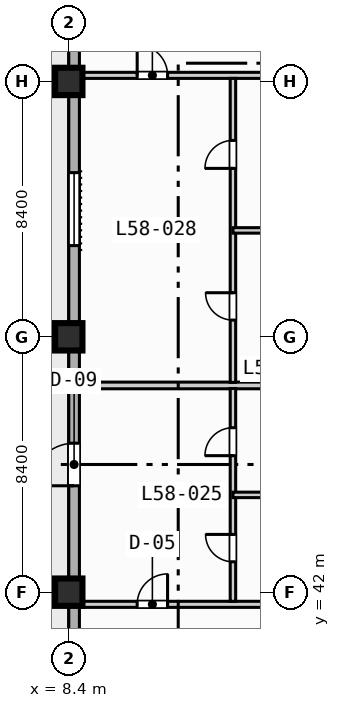
"""IFC4 building model, lengths in metres.
Left out: names, types, materials, properties, quantities, classifications, styles, units other than length and angle.
Written with IfcOpenShell. Run it as: python <this file> out.ifc"""

import sys

from ifc_helpers import new_model, si_unit, direction, frame, frame_2d, origin, origin_2d, place, context, subcontext, project, spatial, rectangle, extrude, element, fill, save


model = new_model("IFC4")
c1 = context("Model", 3, precision=1e-05, world=origin(), true_north=direction((0.0, 1.0)))
c2 = subcontext(c1, "Body", "Model", "MODEL_VIEW")
j1 = project(units=[si_unit("LENGTHUNIT", "METRE"), si_unit("PLANEANGLEUNIT", "RADIAN")], contexts=[c1])
p1 = place(None, origin())
s1 = spatial("IfcSite", under=j1, at=p1, CompositionType="ELEMENT")
p2 = place(p1, origin())
s2 = spatial("IfcBuilding", under=s1, at=p2, CompositionType="ELEMENT")
p3 = place(p2, frame((0.0, 0.0, 237.9)))
s3 = spatial("IfcBuildingStorey", under=s2, at=p3, CompositionType="ELEMENT", Elevation=237.9)
for number, where, z_axis, x_axis in (
    (1, (8.4, 42.0, 0.0), (0.0, 0.0, 1.0), (1.0, 0.0, 0.0)),
    (2, (8.4, 50.4, 0.0), (0.0, 0.0, 1.0), (1.0, 0.0, 0.0)),
    (3, (8.4, 58.8, 0.0), (0.0, 0.0, 1.0), (1.0, 0.0, 0.0)),
):
    element("IfcColumn", number, at=place(p3, frame(where, z_axis=z_axis, x_axis=x_axis)), inside=s3, PredefinedType="COLUMN", context=c2, shape_type="SweptSolid", body=[
        extrude(rectangle(XDim=0.9, YDim=0.9, at=origin_2d()), origin(), (0.0, 0.0, 1.0), 3.7),
    ])
p4 = place(p3, frame((8.575, 11.575, 0.0), z_axis=(0.0, 0.0, 1.0), x_axis=(0.0, 1.0, 0.0)))
e4 = element("IfcWall", 4, at=p4, inside=s3, PredefinedType="STANDARD", context=c2, shape_type="SweptSolid", body=[
    extrude(rectangle(XDim=60.85, YDim=0.35, at=frame_2d((30.425, 0.0))), origin(), (0.0, 0.0, 1.0), 3.47),
])
p5 = place(p4, frame((33.925, 0.0, 0.0)))
e5 = element("IfcOpeningElement", 5, at=p5, cuts=e4, PredefinedType="OPENING", context=c2, shape_type="SweptSolid", body=[
    extrude(rectangle(XDim=1.4, YDim=2.2, at=frame_2d((0.7, 1.1))), frame((0.0, 0.185, 0.0), z_axis=(0.0, -1.0, 0.0), x_axis=(1.0, 0.0, 0.0)), (0.0, 0.0, 1.0), 0.37),
])
p6 = place(p4, frame((25.025, 0.0, 0.85)))
e6 = element("IfcOpeningElement", 6, at=p6, cuts=e4, PredefinedType="OPENING", context=c2, shape_type="SweptSolid", body=[
    extrude(rectangle(XDim=2.4, YDim=1.95, at=frame_2d((1.2, 0.975))), frame((0.0, 0.185, 0.0), z_axis=(0.0, -1.0, 0.0), x_axis=(1.0, 0.0, 0.0)), (0.0, 0.0, 1.0), 0.37),
])
p7 = place(p4, frame((41.825, 0.0, 0.85)))
e7 = element("IfcOpeningElement", 7, at=p7, cuts=e4, PredefinedType="OPENING", context=c2, shape_type="SweptSolid", body=[
    extrude(rectangle(XDim=2.4, YDim=1.95, at=frame_2d((1.2, 0.975))), frame((0.0, 0.185, 0.0), z_axis=(0.0, -1.0, 0.0), x_axis=(1.0, 0.0, 0.0)), (0.0, 0.0, 1.0), 0.37),
])
p8 = place(p3, frame((8.65, 41.6, 0.0), z_axis=(0.0, 0.0, 1.0), x_axis=(1.0, 0.0, 0.0)))
e8 = element("IfcWall", 8, at=p8, inside=s3, PredefinedType="PARTITIONING", context=c2, shape_type="SweptSolid", body=[
    extrude(rectangle(XDim=7.95, YDim=0.2, at=frame_2d((3.975, 0.0))), origin(), (0.0, 0.0, 1.0), 3.47),
])
p9 = place(p8, frame((2.0, 0.0, 0.0)))
e9 = element("IfcOpeningElement", 9, at=p9, cuts=e8, PredefinedType="OPENING", context=c2, shape_type="SweptSolid", body=[
    extrude(rectangle(XDim=1.0, YDim=2.15, at=frame_2d((0.5, 1.075))), frame((0.0, 0.11, 0.0), z_axis=(0.0, -1.0, 0.0), x_axis=(1.0, 0.0, 0.0)), (0.0, 0.0, 1.0), 0.22),
])
p10 = place(p3, frame((8.65, 59.0, 0.0), z_axis=(0.0, 0.0, 1.0), x_axis=(1.0, 0.0, 0.0)))
e10 = element("IfcWall", 10, at=p10, inside=s3, PredefinedType="PARTITIONING", context=c2, shape_type="SweptSolid", body=[
    extrude(rectangle(XDim=7.95, YDim=0.2, at=frame_2d((3.975, 0.0))), origin(), (0.0, 0.0, 1.0), 2.82),
])
p11 = place(p10, frame((2.0, 0.0, 0.0)))
e11 = element("IfcOpeningElement", 11, at=p11, cuts=e10, PredefinedType="OPENING", context=c2, shape_type="SweptSolid", body=[
    extrude(rectangle(XDim=1.0, YDim=2.15, at=frame_2d((0.5, 1.075))), frame((0.0, 0.11, 0.0), z_axis=(0.0, -1.0, 0.0), x_axis=(1.0, 0.0, 0.0)), (0.0, 0.0, 1.0), 0.22),
])
p12 = place(p3, frame((8.65, 48.8, 0.0), z_axis=(0.0, 0.0, 1.0), x_axis=(1.0, 0.0, 0.0)))
e12 = element("IfcWall", 12, at=p12, inside=s3, PredefinedType="PARTITIONING", context=c2, shape_type="SweptSolid", body=[
    extrude(rectangle(XDim=7.95, YDim=0.22, at=frame_2d((3.975, 0.0))), origin(), (0.0, 0.0, 1.0), 3.47),
])
p13 = place(p3, frame((13.8, 41.7, 0.0), z_axis=(0.0, 0.0, 1.0), x_axis=(0.0, 1.0, 0.0)))
e13 = element("IfcWall", 13, at=p13, inside=s3, PredefinedType="PLUMBINGWALL", context=c2, shape_type="SweptSolid", body=[
    extrude(rectangle(XDim=7.0, YDim=0.18, at=frame_2d((3.5, 0.0))), origin(), (0.0, 0.0, 1.0), 3.47),
])
p14 = place(p13, frame((1.3, 0.0, 0.0)))
e14 = element("IfcOpeningElement", 14, at=p14, cuts=e13, PredefinedType="OPENING", context=c2, shape_type="SweptSolid", body=[
    extrude(rectangle(XDim=0.9, YDim=2.1, at=frame_2d((0.45, 1.05))), frame((0.0, 0.1, 0.0), z_axis=(0.0, -1.0, 0.0), x_axis=(1.0, 0.0, 0.0)), (0.0, 0.0, 1.0), 0.2),
])
p15 = place(p13, frame((4.79, 0.0, 0.0)))
e15 = element("IfcOpeningElement", 15, at=p15, cuts=e13, PredefinedType="OPENING", context=c2, shape_type="SweptSolid", body=[
    extrude(rectangle(XDim=0.92, YDim=2.1, at=frame_2d((0.46, 1.05))), frame((0.0, 0.1, 0.0), z_axis=(0.0, -1.0, 0.0), x_axis=(1.0, 0.0, 0.0)), (0.0, 0.0, 1.0), 0.2),
])
p16 = place(p3, frame((13.8, 45.2, 0.0), z_axis=(0.0, 0.0, 1.0), x_axis=(1.0, 0.0, 0.0)))
e16 = element("IfcWall", 16, at=p16, inside=s3, PredefinedType="PLUMBINGWALL", context=c2, shape_type="SweptSolid", body=[
    extrude(rectangle(XDim=2.8, YDim=0.18, at=frame_2d((1.4, 0.0))), origin(), (0.0, 0.0, 1.0), 3.47),
])
p17 = place(p3, frame((13.8, 48.9, 0.0), z_axis=(0.0, 0.0, 1.0), x_axis=(0.0, 1.0, 0.0)))
e17 = element("IfcWall", 17, at=p17, inside=s3, PredefinedType="PLUMBINGWALL", context=c2, shape_type="SweptSolid", body=[
    extrude(rectangle(XDim=10.0, YDim=0.18, at=frame_2d((5.0, 0.0))), origin(), (0.0, 0.0, 1.0), 3.47),
])
p18 = place(p17, frame((2.05, 0.0, 0.0)))
e18 = element("IfcOpeningElement", 18, at=p18, cuts=e17, PredefinedType="OPENING", context=c2, shape_type="SweptSolid", body=[
    extrude(rectangle(XDim=0.9, YDim=2.1, at=frame_2d((0.45, 1.05))), frame((0.0, 0.1, 0.0), z_axis=(0.0, -1.0, 0.0), x_axis=(1.0, 0.0, 0.0)), (0.0, 0.0, 1.0), 0.2),
])
p19 = place(p17, frame((7.04, 0.0, 0.0)))
e19 = element("IfcOpeningElement", 19, at=p19, cuts=e17, PredefinedType="OPENING", context=c2, shape_type="SweptSolid", body=[
    extrude(rectangle(XDim=0.92, YDim=2.1, at=frame_2d((0.46, 1.05))), frame((0.0, 0.1, 0.0), z_axis=(0.0, -1.0, 0.0), x_axis=(1.0, 0.0, 0.0)), (0.0, 0.0, 1.0), 0.2),
])
p20 = place(p3, frame((13.8, 53.9, 0.0), z_axis=(0.0, 0.0, 1.0), x_axis=(1.0, 0.0, 0.0)))
e20 = element("IfcWall", 20, at=p20, inside=s3, PredefinedType="PLUMBINGWALL", context=c2, shape_type="SweptSolid", body=[
    extrude(rectangle(XDim=2.8, YDim=0.18, at=frame_2d((1.4, 0.0))), origin(), (0.0, 0.0, 1.0), 3.47),
])
p21 = place(p5, origin())
e21 = element("IfcDoor", 21, at=p21, inside=s3, OperationType="SINGLE_SWING_LEFT", PredefinedType="DOOR", context=c2, shape_type="SweptSolid", body=[
    extrude(rectangle(XDim=1.4, YDim=2.2, at=frame_2d((0.7, 1.1))), frame((0.0, 0.025, 0.0), z_axis=(0.0, -1.0, 0.0), x_axis=(1.0, 0.0, 0.0)), (0.0, 0.0, 1.0), 0.05),
])
fill(e5, e21)
p22 = place(p7, origin())
e22 = element("IfcWindow", 22, at=p22, inside=s3, PartitioningType="SINGLE_PANEL", PredefinedType="WINDOW", context=c2, shape_type="SweptSolid", body=[
    extrude(rectangle(XDim=2.4, YDim=1.95, at=frame_2d((1.2, 0.975))), frame((0.0, 0.03, 0.0), z_axis=(0.0, -1.0, 0.0), x_axis=(1.0, 0.0, 0.0)), (0.0, 0.0, 1.0), 0.06),
])
fill(e7, e22)
p23 = place(p9, origin())
e23 = element("IfcDoor", 23, at=p23, inside=s3, OperationType="SINGLE_SWING_RIGHT", PredefinedType="DOOR", context=c2, shape_type="SweptSolid", body=[
    extrude(rectangle(XDim=1.0, YDim=2.15, at=frame_2d((0.5, 1.075))), frame((0.0, 0.025, 0.0), z_axis=(0.0, -1.0, 0.0), x_axis=(1.0, 0.0, 0.0)), (0.0, 0.0, 1.0), 0.05),
])
fill(e9, e23)
p24 = place(p11, origin())
e24 = element("IfcDoor", 24, at=p24, inside=s3, OperationType="SINGLE_SWING_LEFT", PredefinedType="DOOR", context=c2, shape_type="SweptSolid", body=[
    extrude(rectangle(XDim=1.0, YDim=2.15, at=frame_2d((0.5, 1.075))), frame((0.0, 0.025, 0.0), z_axis=(0.0, -1.0, 0.0), x_axis=(1.0, 0.0, 0.0)), (0.0, 0.0, 1.0), 0.05),
])
fill(e11, e24)
p25 = place(p14, origin())
e25 = element("IfcDoor", 25, at=p25, inside=s3, OperationType="SINGLE_SWING_RIGHT", PredefinedType="DOOR", context=c2, shape_type="SweptSolid", body=[
    extrude(rectangle(XDim=0.9, YDim=2.1, at=frame_2d((0.45, 1.05))), frame((0.0, 0.025, 0.0), z_axis=(0.0, -1.0, 0.0), x_axis=(1.0, 0.0, 0.0)), (0.0, 0.0, 1.0), 0.05),
])
fill(e14, e25)
p26 = place(p15, origin())
e26 = element("IfcDoor", 26, at=p26, inside=s3, OperationType="SINGLE_SWING_LEFT", PredefinedType="DOOR", context=c2, shape_type="SweptSolid", body=[
    extrude(rectangle(XDim=0.92, YDim=2.1, at=frame_2d((0.46, 1.05))), frame((0.0, 0.025, 0.0), z_axis=(0.0, -1.0, 0.0), x_axis=(1.0, 0.0, 0.0)), (0.0, 0.0, 1.0), 0.05),
])
fill(e15, e26)
p27 = place(p18, origin())
e27 = element("IfcDoor", 27, at=p27, inside=s3, OperationType="SINGLE_SWING_RIGHT", PredefinedType="DOOR", context=c2, shape_type="SweptSolid", body=[
    extrude(rectangle(XDim=0.9, YDim=2.1, at=frame_2d((0.45, 1.05))), frame((0.0, 0.025, 0.0), z_axis=(0.0, -1.0, 0.0), x_axis=(1.0, 0.0, 0.0)), (0.0, 0.0, 1.0), 0.05),
])
fill(e18, e27)
p28 = place(p19, origin())
e28 = element("IfcDoor", 28, at=p28, inside=s3, OperationType="SINGLE_SWING_LEFT", PredefinedType="DOOR", context=c2, shape_type="SweptSolid", body=[
    extrude(rectangle(XDim=0.92, YDim=2.1, at=frame_2d((0.46, 1.05))), frame((0.0, 0.025, 0.0), z_axis=(0.0, -1.0, 0.0), x_axis=(1.0, 0.0, 0.0)), (0.0, 0.0, 1.0), 0.05),
])
fill(e19, e28)
save(model, sys.argv[1])
